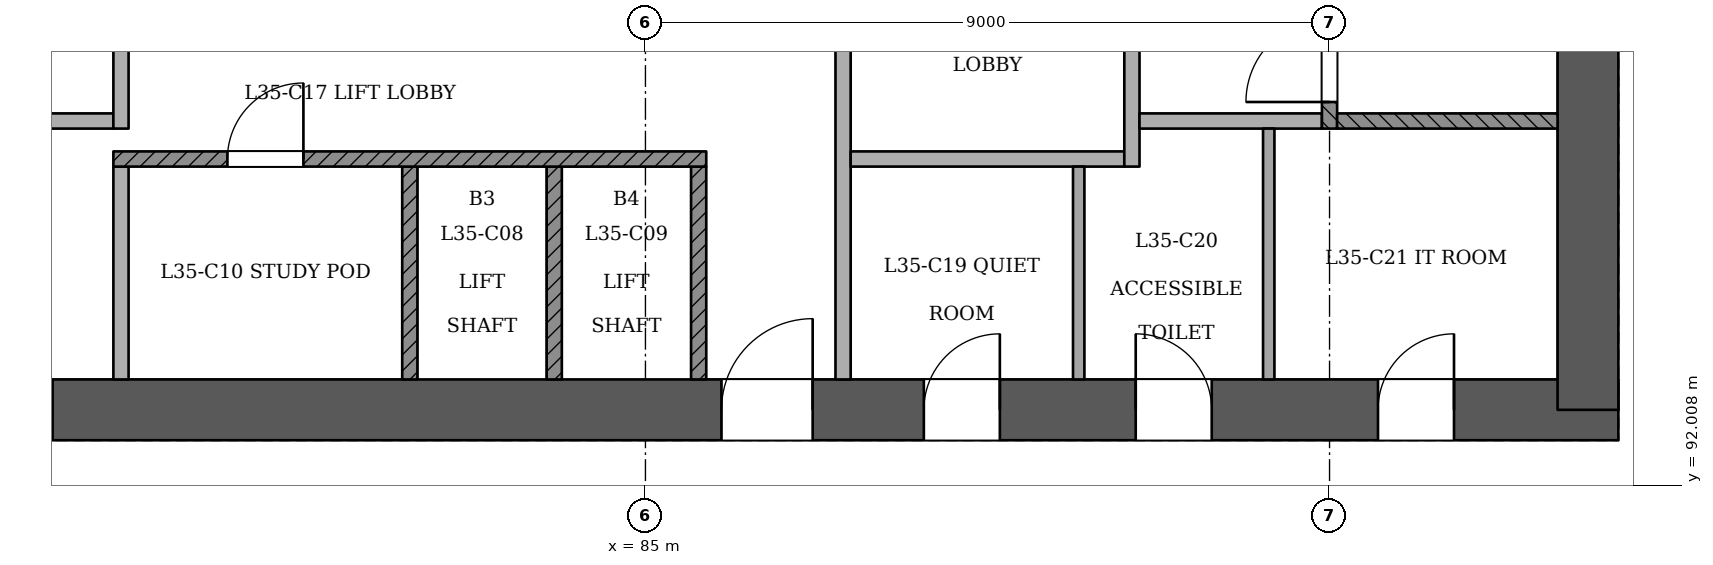
"""IFC4 building model, lengths in metres.
Left out: names, types, materials, properties, quantities, classifications, styles, units other than length and angle.
Written with IfcOpenShell. Run it as: python <this file> out.ifc"""

import sys

from ifc_helpers import new_model, si_unit, direction, frame, frame_2d, origin, place, context, subcontext, project, spatial, rectangle, extrude, element, fill, save


model = new_model("IFC4")
c1 = context("Model", 3, precision=1e-05, world=origin(), true_north=direction((0.0, 1.0)))
c2 = subcontext(c1, "Body", "Model", "MODEL_VIEW")
j1 = project(units=[si_unit("LENGTHUNIT", "METRE"), si_unit("PLANEANGLEUNIT", "RADIAN")], contexts=[c1])
p1 = place(None, origin())
s1 = spatial("IfcSite", under=j1, at=p1, CompositionType="ELEMENT")
p2 = place(p1, origin())
s2 = spatial("IfcBuilding", under=s1, at=p2, CompositionType="ELEMENT")
p3 = place(p2, frame((0.0, 0.0, 138.6)))
s3 = spatial("IfcBuildingStorey", under=s2, at=p3, CompositionType="ELEMENT", Elevation=138.6)
p4 = place(p3, frame((72.6, 93.0, 0.0), z_axis=(0.0, 0.0, 1.0), x_axis=(1.0, 0.0, 0.0)))
e1 = element("IfcWall", 1, at=p4, inside=s3, PredefinedType="SHEAR", context=c2, shape_type="SweptSolid", body=[
    extrude(rectangle(XDim=25.2, YDim=0.8, at=frame_2d((12.6, 0.0))), origin(), (0.0, 0.0, 1.0), 3.6),
])
p5 = place(p4, frame((1.2, 0.0, 0.0)))
e2 = element("IfcOpeningElement", 2, at=p5, cuts=e1, PredefinedType="OPENING", context=c2, shape_type="SweptSolid", body=[
    extrude(rectangle(XDim=1.2, YDim=2.1, at=frame_2d((0.6, 1.05))), frame((0.0, 0.411, 0.0), z_axis=(0.0, -1.0, 0.0), x_axis=(1.0, 0.0, 0.0)), (0.0, 0.0, 1.0), 0.821),
])
p6 = place(p4, frame((3.4, 0.0, 0.0)))
e3 = element("IfcOpeningElement", 3, at=p6, cuts=e1, PredefinedType="OPENING", context=c2, shape_type="SweptSolid", body=[
    extrude(rectangle(XDim=1.2, YDim=2.1, at=frame_2d((0.6, 1.05))), frame((0.0, 0.411, 0.0), z_axis=(0.0, -1.0, 0.0), x_axis=(1.0, 0.0, 0.0)), (0.0, 0.0, 1.0), 0.821),
])
p7 = place(p4, frame((13.4, 0.0, 0.0)))
e4 = element("IfcOpeningElement", 4, at=p7, cuts=e1, PredefinedType="OPENING", context=c2, shape_type="SweptSolid", body=[
    extrude(rectangle(XDim=1.2, YDim=2.1, at=frame_2d((0.6, 1.05))), frame((0.0, 0.411, 0.0), z_axis=(0.0, -1.0, 0.0), x_axis=(1.0, 0.0, 0.0)), (0.0, 0.0, 1.0), 0.821),
])
p8 = place(p4, frame((16.062, 0.0, 0.0)))
e5 = element("IfcOpeningElement", 5, at=p8, cuts=e1, PredefinedType="OPENING", context=c2, shape_type="SweptSolid", body=[
    extrude(rectangle(XDim=1.0, YDim=2.1, at=frame_2d((0.5, 1.05))), frame((0.0, 0.411, 0.0), z_axis=(0.0, -1.0, 0.0), x_axis=(1.0, 0.0, 0.0)), (0.0, 0.0, 1.0), 0.821),
])
p9 = place(p4, frame((18.85, 0.0, 0.0)))
e6 = element("IfcOpeningElement", 6, at=p9, cuts=e1, PredefinedType="OPENING", context=c2, shape_type="SweptSolid", body=[
    extrude(rectangle(XDim=1.0, YDim=2.1, at=frame_2d((0.5, 1.05))), frame((0.0, 0.411, 0.0), z_axis=(0.0, -1.0, 0.0), x_axis=(1.0, 0.0, 0.0)), (0.0, 0.0, 1.0), 0.821),
])
p10 = place(p4, frame((22.038, 0.0, 0.0)))
e7 = element("IfcOpeningElement", 7, at=p10, cuts=e1, PredefinedType="OPENING", context=c2, shape_type="SweptSolid", body=[
    extrude(rectangle(XDim=1.0, YDim=2.1, at=frame_2d((0.5, 1.05))), frame((0.0, 0.411, 0.0), z_axis=(0.0, -1.0, 0.0), x_axis=(1.0, 0.0, 0.0)), (0.0, 0.0, 1.0), 0.821),
])
p11 = place(p3, frame((97.4, 93.0, 0.0), z_axis=(0.0, 0.0, 1.0), x_axis=(0.0, 1.0, 0.0)))
e8 = element("IfcWall", 8, at=p11, inside=s3, PredefinedType="SHEAR", context=c2, shape_type="SweptSolid", body=[
    extrude(rectangle(XDim=11.2, YDim=0.8, at=frame_2d((5.6, 0.0))), origin(), (0.0, 0.0, 1.0), 3.6),
])
p12 = place(p3, frame((64.899, 98.406, 0.0), z_axis=(0.0, 0.0, 1.0), x_axis=(0.499995137693, -0.86602821102, 0.0)))
e9 = element("IfcWall", 9, at=p12, inside=s3, PredefinedType="PARTITIONING", context=c2, shape_type="SweptSolid", body=[
    extrude(rectangle(XDim=40.094, YDim=0.15, at=frame_2d((20.047, 0.0))), origin(), (0.0, 0.0, 1.0), 2.75),
])
p13 = place(p12, frame((0.2, 0.0, 0.0)))
e10 = element("IfcOpeningElement", 10, at=p13, cuts=e9, PredefinedType="OPENING", context=c2, shape_type="SweptSolid", body=[
    extrude(rectangle(XDim=1.2, YDim=2.1, at=frame_2d((0.6, 1.05))), frame((0.0, 0.085, 0.0), z_axis=(0.0, -1.0, 0.0), x_axis=(1.0, 0.0, 0.0)), (0.0, 0.0, 1.0), 0.171),
])
p14 = place(p12, frame((9.442, 0.0, 0.0)))
e11 = element("IfcOpeningElement", 11, at=p14, cuts=e9, PredefinedType="OPENING", context=c2, shape_type="SweptSolid", body=[
    extrude(rectangle(XDim=1.0, YDim=2.1, at=frame_2d((0.5, 1.05))), frame((0.0, 0.085, 0.0), z_axis=(0.0, -1.0, 0.0), x_axis=(1.0, 0.0, 0.0)), (0.0, 0.0, 1.0), 0.171),
])
p15 = place(p12, frame((11.652, 0.0, 0.0)))
e12 = element("IfcOpeningElement", 12, at=p15, cuts=e9, PredefinedType="OPENING", context=c2, shape_type="SweptSolid", body=[
    extrude(rectangle(XDim=1.0, YDim=2.1, at=frame_2d((0.5, 1.05))), frame((0.0, 0.085, 0.0), z_axis=(0.0, -1.0, 0.0), x_axis=(1.0, 0.0, 0.0)), (0.0, 0.0, 1.0), 0.171),
])
p16 = place(p12, frame((19.447, 0.0, 0.0)))
e13 = element("IfcOpeningElement", 13, at=p16, cuts=e9, PredefinedType="OPENING", context=c2, shape_type="SweptSolid", body=[
    extrude(rectangle(XDim=1.2, YDim=2.1, at=frame_2d((0.6, 1.05))), frame((0.0, 0.085, 0.0), z_axis=(0.0, -1.0, 0.0), x_axis=(1.0, 0.0, 0.0)), (0.0, 0.0, 1.0), 0.171),
])
p17 = place(p12, frame((27.327, 0.0, 0.0)))
e14 = element("IfcOpeningElement", 14, at=p17, cuts=e9, PredefinedType="OPENING", context=c2, shape_type="SweptSolid", body=[
    extrude(rectangle(XDim=1.0, YDim=2.1, at=frame_2d((0.5, 1.05))), frame((0.0, 0.085, 0.0), z_axis=(0.0, -1.0, 0.0), x_axis=(1.0, 0.0, 0.0)), (0.0, 0.0, 1.0), 0.171),
])
p18 = place(p12, frame((31.847, 0.0, 0.0)))
e15 = element("IfcOpeningElement", 15, at=p18, cuts=e9, PredefinedType="OPENING", context=c2, shape_type="SweptSolid", body=[
    extrude(rectangle(XDim=1.2, YDim=2.1, at=frame_2d((0.6, 1.05))), frame((0.0, 0.085, 0.0), z_axis=(0.0, -1.0, 0.0), x_axis=(1.0, 0.0, 0.0)), (0.0, 0.0, 1.0), 0.171),
])
p19 = place(p12, frame((38.558, 0.0, 0.0)))
e16 = element("IfcOpeningElement", 16, at=p19, cuts=e9, PredefinedType="OPENING", context=c2, shape_type="SweptSolid", body=[
    extrude(rectangle(XDim=1.0, YDim=2.1, at=frame_2d((0.5, 1.05))), frame((0.0, 0.085, 0.0), z_axis=(0.0, -1.0, 0.0), x_axis=(1.0, 0.0, 0.0)), (0.0, 0.0, 1.0), 0.171),
])
p20 = place(p3, frame((85.054, 63.684, 0.0), z_axis=(0.0, 0.0, 1.0), x_axis=(0.499999704591, 0.866025574339, 0.0)))
e17 = element("IfcWall", 17, at=p20, inside=s3, PredefinedType="PARTITIONING", context=c2, shape_type="SweptSolid", body=[
    extrude(rectangle(XDim=40.094, YDim=0.15, at=frame_2d((20.047, 0.0))), origin(), (0.0, 0.0, 1.0), 2.75),
])
p21 = place(p20, frame((0.506, 0.0, 0.0)))
e18 = element("IfcOpeningElement", 18, at=p21, cuts=e17, PredefinedType="OPENING", context=c2, shape_type="SweptSolid", body=[
    extrude(rectangle(XDim=1.2, YDim=2.1, at=frame_2d((0.6, 1.05))), frame((0.0, 0.085, 0.0), z_axis=(0.0, -1.0, 0.0), x_axis=(1.0, 0.0, 0.0)), (0.0, 0.0, 1.0), 0.171),
])
p22 = place(p20, frame((2.767, 0.0, 0.0)))
e19 = element("IfcOpeningElement", 19, at=p22, cuts=e17, PredefinedType="OPENING", context=c2, shape_type="SweptSolid", body=[
    extrude(rectangle(XDim=1.0, YDim=2.1, at=frame_2d((0.5, 1.05))), frame((0.0, 0.085, 0.0), z_axis=(0.0, -1.0, 0.0), x_axis=(1.0, 0.0, 0.0)), (0.0, 0.0, 1.0), 0.171),
])
p23 = place(p20, frame((8.297, 0.0, 0.0)))
e20 = element("IfcOpeningElement", 20, at=p23, cuts=e17, PredefinedType="OPENING", context=c2, shape_type="SweptSolid", body=[
    extrude(rectangle(XDim=1.0, YDim=2.1, at=frame_2d((0.5, 1.05))), frame((0.0, 0.085, 0.0), z_axis=(0.0, -1.0, 0.0), x_axis=(1.0, 0.0, 0.0)), (0.0, 0.0, 1.0), 0.171),
])
p24 = place(p20, frame((11.652, 0.0, 0.0)))
e21 = element("IfcOpeningElement", 21, at=p24, cuts=e17, PredefinedType="OPENING", context=c2, shape_type="SweptSolid", body=[
    extrude(rectangle(XDim=1.0, YDim=2.1, at=frame_2d((0.5, 1.05))), frame((0.0, 0.085, 0.0), z_axis=(0.0, -1.0, 0.0), x_axis=(1.0, 0.0, 0.0)), (0.0, 0.0, 1.0), 0.171),
])
p25 = place(p20, frame((18.327, 0.0, 0.0)))
e22 = element("IfcOpeningElement", 22, at=p25, cuts=e17, PredefinedType="OPENING", context=c2, shape_type="SweptSolid", body=[
    extrude(rectangle(XDim=1.0, YDim=2.1, at=frame_2d((0.5, 1.05))), frame((0.0, 0.085, 0.0), z_axis=(0.0, -1.0, 0.0), x_axis=(1.0, 0.0, 0.0)), (0.0, 0.0, 1.0), 0.171),
])
p26 = place(p20, frame((20.767, 0.0, 0.0)))
e23 = element("IfcOpeningElement", 23, at=p26, cuts=e17, PredefinedType="OPENING", context=c2, shape_type="SweptSolid", body=[
    extrude(rectangle(XDim=1.0, YDim=2.1, at=frame_2d((0.5, 1.05))), frame((0.0, 0.085, 0.0), z_axis=(0.0, -1.0, 0.0), x_axis=(1.0, 0.0, 0.0)), (0.0, 0.0, 1.0), 0.171),
])
p27 = place(p20, frame((26.297, 0.0, 0.0)))
e24 = element("IfcOpeningElement", 24, at=p27, cuts=e17, PredefinedType="OPENING", context=c2, shape_type="SweptSolid", body=[
    extrude(rectangle(XDim=1.0, YDim=2.1, at=frame_2d((0.5, 1.05))), frame((0.0, 0.085, 0.0), z_axis=(0.0, -1.0, 0.0), x_axis=(1.0, 0.0, 0.0)), (0.0, 0.0, 1.0), 0.171),
])
p28 = place(p20, frame((31.847, 0.0, 0.0)))
e25 = element("IfcOpeningElement", 25, at=p28, cuts=e17, PredefinedType="OPENING", context=c2, shape_type="SweptSolid", body=[
    extrude(rectangle(XDim=1.2, YDim=2.1, at=frame_2d((0.6, 1.05))), frame((0.0, 0.085, 0.0), z_axis=(0.0, -1.0, 0.0), x_axis=(1.0, 0.0, 0.0)), (0.0, 0.0, 1.0), 0.171),
])
p29 = place(p20, frame((38.694, 0.0, 0.0)))
e26 = element("IfcOpeningElement", 26, at=p29, cuts=e17, PredefinedType="OPENING", context=c2, shape_type="SweptSolid", body=[
    extrude(rectangle(XDim=1.2, YDim=2.1, at=frame_2d((0.6, 1.05))), frame((0.0, 0.085, 0.0), z_axis=(0.0, -1.0, 0.0), x_axis=(1.0, 0.0, 0.0)), (0.0, 0.0, 1.0), 0.171),
])
p30 = place(p3, frame((78.1, 93.4, 0.0), z_axis=(0.0, 0.0, 1.0), x_axis=(0.0, 1.0, 0.0)))
e27 = element("IfcWall", 27, at=p30, inside=s3, PredefinedType="PARTITIONING", context=c2, shape_type="SweptSolid", body=[
    extrude(rectangle(XDim=2.8, YDim=0.2, at=frame_2d((1.4, 0.0))), origin(), (0.0, 0.0, 1.0), 3.15),
])
for number, where, z_axis, x_axis in (
    (28, (81.9, 93.4, 0.0), (0.0, 0.0, 1.0), (0.0, 1.0, 0.0)),
    (29, (83.8, 93.4, 0.0), (0.0, 0.0, 1.0), (0.0, 1.0, 0.0)),
    (30, (85.7, 93.4, 0.0), (0.0, 0.0, 1.0), (0.0, 1.0, 0.0)),
):
    element("IfcWall", number, at=place(p3, frame(where, z_axis=z_axis, x_axis=x_axis)), inside=s3, PredefinedType="SOLIDWALL", context=c2, shape_type="SweptSolid", body=[
        extrude(rectangle(XDim=2.8, YDim=0.2, at=frame_2d((1.4, 0.0))), origin(), (0.0, 0.0, 1.0), 3.15),
    ])
p31 = place(p3, frame((87.6, 93.4, 0.0), z_axis=(0.0, 0.0, 1.0), x_axis=(0.0, 1.0, 0.0)))
e31 = element("IfcWall", 31, at=p31, inside=s3, PredefinedType="PARTITIONING", context=c2, shape_type="SweptSolid", body=[
    extrude(rectangle(XDim=7.0, YDim=0.2, at=frame_2d((3.5, 0.0))), origin(), (0.0, 0.0, 1.0), 3.15),
])
p32 = place(p31, frame((4.45, 0.0, 0.0)))
e32 = element("IfcOpeningElement", 32, at=p32, cuts=e31, PredefinedType="OPENING", context=c2, shape_type="SweptSolid", body=[
    extrude(rectangle(XDim=1.1, YDim=2.1, at=frame_2d((0.55, 1.05))), frame((0.0, 0.11, 0.0), z_axis=(0.0, -1.0, 0.0), x_axis=(1.0, 0.0, 0.0)), (0.0, 0.0, 1.0), 0.221),
])
p33 = place(p3, frame((90.7, 93.4, 0.0), z_axis=(0.0, 0.0, 1.0), x_axis=(0.0, 1.0, 0.0)))
e33 = element("IfcWall", 33, at=p33, inside=s3, PredefinedType="PARTITIONING", context=c2, shape_type="SweptSolid", body=[
    extrude(rectangle(XDim=2.8, YDim=0.15, at=frame_2d((1.4, 0.0))), origin(), (0.0, 0.0, 1.0), 3.15),
])
p34 = place(p3, frame((93.2, 93.4, 0.0), z_axis=(0.0, 0.0, 1.0), x_axis=(0.0, 1.0, 0.0)))
e34 = element("IfcWall", 34, at=p34, inside=s3, PredefinedType="PARTITIONING", context=c2, shape_type="SweptSolid", body=[
    extrude(rectangle(XDim=3.3, YDim=0.15, at=frame_2d((1.65, 0.0))), origin(), (0.0, 0.0, 1.0), 3.15),
])
p35 = place(p3, frame((78.0, 96.3, 0.0), z_axis=(0.0, 0.0, 1.0), x_axis=(1.0, 0.0, 0.0)))
e35 = element("IfcWall", 35, at=p35, inside=s3, PredefinedType="SOLIDWALL", context=c2, shape_type="SweptSolid", body=[
    extrude(rectangle(XDim=7.8, YDim=0.2, at=frame_2d((3.9, 0.0))), origin(), (0.0, 0.0, 1.0), 3.15),
])
p36 = place(p35, frame((1.5, 0.0, 0.0)))
e36 = element("IfcOpeningElement", 36, at=p36, cuts=e35, PredefinedType="OPENING", context=c2, shape_type="SweptSolid", body=[
    extrude(rectangle(XDim=1.0, YDim=2.1, at=frame_2d((0.5, 1.05))), frame((0.0, 0.11, 0.0), z_axis=(0.0, -1.0, 0.0), x_axis=(1.0, 0.0, 0.0)), (0.0, 0.0, 1.0), 0.221),
])
p37 = place(p3, frame((87.7, 96.3, 0.0), z_axis=(0.0, 0.0, 1.0), x_axis=(1.0, 0.0, 0.0)))
e37 = element("IfcWall", 37, at=p37, inside=s3, PredefinedType="PARTITIONING", context=c2, shape_type="SweptSolid", body=[
    extrude(rectangle(XDim=3.6, YDim=0.2, at=frame_2d((1.8, 0.0))), origin(), (0.0, 0.0, 1.0), 3.15),
])
p38 = place(p3, frame((91.4, 96.2, 0.0), z_axis=(0.0, 0.0, 1.0), x_axis=(0.0, 1.0, 0.0)))
e38 = element("IfcWall", 38, at=p38, inside=s3, PredefinedType="PARTITIONING", context=c2, shape_type="SweptSolid", body=[
    extrude(rectangle(XDim=4.2, YDim=0.2, at=frame_2d((2.1, 0.0))), origin(), (0.0, 0.0, 1.0), 3.15),
])
p39 = place(p38, frame((2.45, 0.0, 0.0)))
e39 = element("IfcOpeningElement", 39, at=p39, cuts=e38, PredefinedType="OPENING", context=c2, shape_type="SweptSolid", body=[
    extrude(rectangle(XDim=1.1, YDim=2.1, at=frame_2d((0.55, 1.05))), frame((0.0, 0.11, 0.0), z_axis=(0.0, -1.0, 0.0), x_axis=(1.0, 0.0, 0.0)), (0.0, 0.0, 1.0), 0.221),
])
p40 = place(p3, frame((76.1, 96.8, 0.0), z_axis=(0.0, 0.0, 1.0), x_axis=(1.0, 0.0, 0.0)))
e40 = element("IfcWall", 40, at=p40, inside=s3, PredefinedType="PARTITIONING", context=c2, shape_type="SweptSolid", body=[
    extrude(rectangle(XDim=1.9, YDim=0.2, at=frame_2d((0.95, 0.0))), origin(), (0.0, 0.0, 1.0), 3.15),
])
p41 = place(p3, frame((78.1, 96.7, 0.0), z_axis=(0.0, 0.0, 1.0), x_axis=(0.0, 1.0, 0.0)))
e41 = element("IfcWall", 41, at=p41, inside=s3, PredefinedType="PARTITIONING", context=c2, shape_type="SweptSolid", body=[
    extrude(rectangle(XDim=3.7, YDim=0.2, at=frame_2d((1.85, 0.0))), origin(), (0.0, 0.0, 1.0), 3.15),
])
p42 = place(p41, frame((1.95, 0.0, 0.0)))
e42 = element("IfcOpeningElement", 42, at=p42, cuts=e41, PredefinedType="OPENING", context=c2, shape_type="SweptSolid", body=[
    extrude(rectangle(XDim=1.1, YDim=2.1, at=frame_2d((0.55, 1.05))), frame((0.0, 0.11, 0.0), z_axis=(0.0, -1.0, 0.0), x_axis=(1.0, 0.0, 0.0)), (0.0, 0.0, 1.0), 0.221),
])
p43 = place(p3, frame((91.5, 96.8, 0.0), z_axis=(0.0, 0.0, 1.0), x_axis=(1.0, 0.0, 0.0)))
e43 = element("IfcWall", 43, at=p43, inside=s3, PredefinedType="PARTITIONING", context=c2, shape_type="SweptSolid", body=[
    extrude(rectangle(XDim=2.4, YDim=0.2, at=frame_2d((1.2, 0.0))), origin(), (0.0, 0.0, 1.0), 3.15),
])
p44 = place(p3, frame((94.0, 96.7, 0.0), z_axis=(0.0, 0.0, 1.0), x_axis=(0.0, 1.0, 0.0)))
e44 = element("IfcWall", 44, at=p44, inside=s3, PredefinedType="SOLIDWALL", context=c2, shape_type="SweptSolid", body=[
    extrude(rectangle(XDim=3.7, YDim=0.2, at=frame_2d((1.85, 0.0))), origin(), (0.0, 0.0, 1.0), 3.15),
])
p45 = place(p44, frame((0.35, 0.0, 0.0)))
e45 = element("IfcOpeningElement", 45, at=p45, cuts=e44, PredefinedType="OPENING", context=c2, shape_type="SweptSolid", body=[
    extrude(rectangle(XDim=1.1, YDim=2.1, at=frame_2d((0.55, 1.05))), frame((0.0, 0.11, 0.0), z_axis=(0.0, -1.0, 0.0), x_axis=(1.0, 0.0, 0.0)), (0.0, 0.0, 1.0), 0.221),
])
p46 = place(p3, frame((94.1, 96.8, 0.0), z_axis=(0.0, 0.0, 1.0), x_axis=(1.0, 0.0, 0.0)))
e46 = element("IfcWall", 46, at=p46, inside=s3, PredefinedType="SOLIDWALL", context=c2, shape_type="SweptSolid", body=[
    extrude(rectangle(XDim=2.9, YDim=0.2, at=frame_2d((1.45, 0.0))), origin(), (0.0, 0.0, 1.0), 3.15),
])
p47 = place(p45, origin())
e47 = element("IfcDoor", 47, at=p47, inside=s3, OperationType="SINGLE_SWING_LEFT", PredefinedType="NOTDEFINED", context=c2, shape_type="SweptSolid", body=[
    extrude(rectangle(XDim=1.1, YDim=2.1, at=frame_2d((0.55, 1.05))), frame((0.0, 0.025, 0.0), z_axis=(0.0, -1.0, 0.0), x_axis=(1.0, 0.0, 0.0)), (0.0, 0.0, 1.0), 0.05),
])
fill(e45, e47)
p48 = place(p6, origin())
e48 = element("IfcDoor", 48, at=p48, inside=s3, OperationType="SINGLE_SWING_LEFT", PredefinedType="NOTDEFINED", context=c2, shape_type="SweptSolid", body=[
    extrude(rectangle(XDim=1.2, YDim=2.1, at=frame_2d((0.6, 1.05))), frame((0.0, 0.025, 0.0), z_axis=(0.0, -1.0, 0.0), x_axis=(1.0, 0.0, 0.0)), (0.0, 0.0, 1.0), 0.05),
])
fill(e3, e48)
p49 = place(p7, origin())
e49 = element("IfcDoor", 49, at=p49, inside=s3, OperationType="SINGLE_SWING_RIGHT", PredefinedType="NOTDEFINED", context=c2, shape_type="SweptSolid", body=[
    extrude(rectangle(XDim=1.2, YDim=2.1, at=frame_2d((0.6, 1.05))), frame((0.0, 0.025, 0.0), z_axis=(0.0, -1.0, 0.0), x_axis=(1.0, 0.0, 0.0)), (0.0, 0.0, 1.0), 0.05),
])
fill(e4, e49)
p50 = place(p8, origin())
e50 = element("IfcDoor", 50, at=p50, inside=s3, OperationType="SINGLE_SWING_RIGHT", PredefinedType="NOTDEFINED", context=c2, shape_type="SweptSolid", body=[
    extrude(rectangle(XDim=1.0, YDim=2.1, at=frame_2d((0.5, 1.05))), frame((0.0, 0.025, 0.0), z_axis=(0.0, -1.0, 0.0), x_axis=(1.0, 0.0, 0.0)), (0.0, 0.0, 1.0), 0.05),
])
fill(e5, e50)
p51 = place(p9, origin())
e51 = element("IfcDoor", 51, at=p51, inside=s3, OperationType="SINGLE_SWING_LEFT", PredefinedType="NOTDEFINED", context=c2, shape_type="SweptSolid", body=[
    extrude(rectangle(XDim=1.0, YDim=2.1, at=frame_2d((0.5, 1.05))), frame((0.0, 0.025, 0.0), z_axis=(0.0, -1.0, 0.0), x_axis=(1.0, 0.0, 0.0)), (0.0, 0.0, 1.0), 0.05),
])
fill(e6, e51)
p52 = place(p10, origin())
e52 = element("IfcDoor", 52, at=p52, inside=s3, OperationType="SINGLE_SWING_RIGHT", PredefinedType="NOTDEFINED", context=c2, shape_type="SweptSolid", body=[
    extrude(rectangle(XDim=1.0, YDim=2.1, at=frame_2d((0.5, 1.05))), frame((0.0, 0.025, 0.0), z_axis=(0.0, -1.0, 0.0), x_axis=(1.0, 0.0, 0.0)), (0.0, 0.0, 1.0), 0.05),
])
fill(e7, e52)
p53 = place(p36, origin())
e53 = element("IfcDoor", 53, at=p53, inside=s3, OperationType="SINGLE_SWING_RIGHT", PredefinedType="NOTDEFINED", context=c2, shape_type="SweptSolid", body=[
    extrude(rectangle(XDim=1.0, YDim=2.1, at=frame_2d((0.5, 1.05))), frame((0.0, 0.025, 0.0), z_axis=(0.0, -1.0, 0.0), x_axis=(1.0, 0.0, 0.0)), (0.0, 0.0, 1.0), 0.05),
])
fill(e36, e53)
save(model, sys.argv[1])
